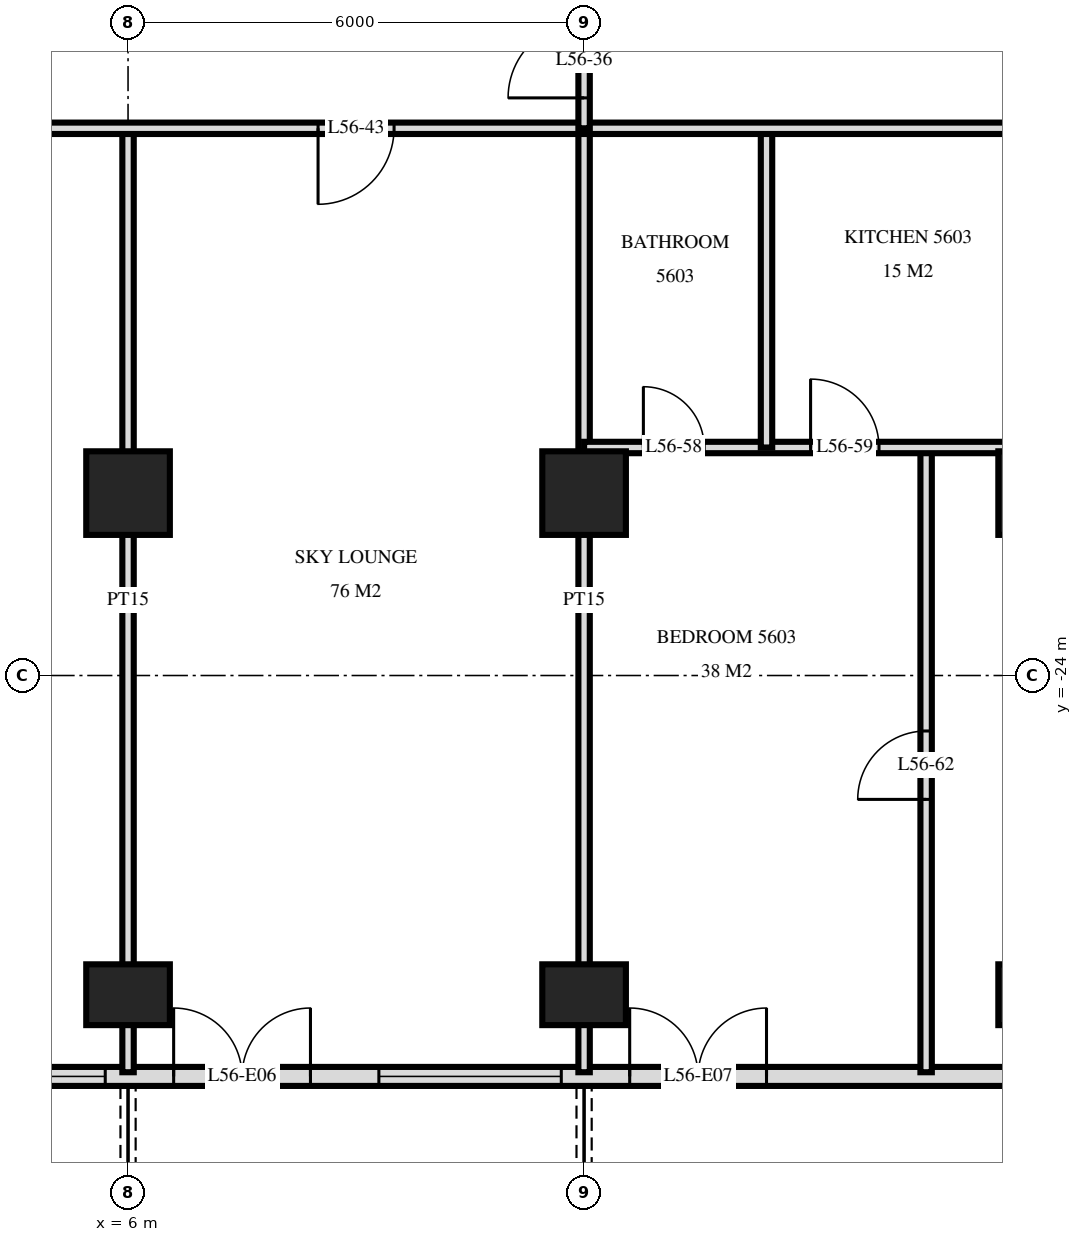
"""IFC4 building model, lengths in metres.
Left out: names, types, materials, properties, quantities, classifications, styles, units other than length and angle.
Written with IfcOpenShell. Run it as: python <this file> out.ifc"""

import sys

from ifc_helpers import new_model, si_unit, direction, frame, frame_2d, origin, origin_2d, place, context, subcontext, project, spatial, rectangle, extrude, element, fill, save


model = new_model("IFC4")
c1 = context("Model", 3, precision=1e-05, world=origin(), true_north=direction((0.0, 1.0)))
c2 = subcontext(c1, "Body", "Model", "MODEL_VIEW")
j1 = project(units=[si_unit("LENGTHUNIT", "METRE"), si_unit("PLANEANGLEUNIT", "RADIAN")], contexts=[c1])
p1 = place(None, origin())
s1 = spatial("IfcSite", under=j1, at=p1, CompositionType="ELEMENT")
p2 = place(p1, origin())
s2 = spatial("IfcBuilding", under=s1, at=p2, CompositionType="ELEMENT")
p3 = place(p2, frame((0.0, 0.0, 215.1)))
s3 = spatial("IfcBuildingStorey", under=s2, at=p3, CompositionType="ELEMENT", Elevation=215.1)
p4 = place(p3, frame((6.0, -28.2, 0.0), z_axis=(0.0, 0.0, 1.0), x_axis=(1.0, 0.0, 0.0)))
e1 = element("IfcColumn", 1, at=p4, inside=s3, PredefinedType="COLUMN", context=c2, shape_type="SweptSolid", body=[
    extrude(rectangle(XDim=1.1, YDim=0.8, at=origin_2d()), origin(), (0.0, 0.0, 1.0), 3.5),
])
p5 = place(p3, frame((6.0, -21.6, 0.0), z_axis=(0.0, 0.0, 1.0), x_axis=(1.0, 0.0, 0.0)))
e2 = element("IfcColumn", 2, at=p5, inside=s3, PredefinedType="COLUMN", context=c2, shape_type="SweptSolid", body=[
    extrude(rectangle(XDim=1.1, YDim=1.1, at=origin_2d()), origin(), (0.0, 0.0, 1.0), 3.5),
])
p6 = place(p3, frame((12.0, -28.2, 0.0), z_axis=(0.0, 0.0, 1.0), x_axis=(1.0, 0.0, 0.0)))
e3 = element("IfcColumn", 3, at=p6, inside=s3, PredefinedType="COLUMN", context=c2, shape_type="SweptSolid", body=[
    extrude(rectangle(XDim=1.1, YDim=0.8, at=origin_2d()), origin(), (0.0, 0.0, 1.0), 3.5),
])
p7 = place(p3, frame((12.0, -21.6, 0.0), z_axis=(0.0, 0.0, 1.0), x_axis=(1.0, 0.0, 0.0)))
e4 = element("IfcColumn", 4, at=p7, inside=s3, PredefinedType="COLUMN", context=c2, shape_type="SweptSolid", body=[
    extrude(rectangle(XDim=1.1, YDim=1.1, at=origin_2d()), origin(), (0.0, 0.0, 1.0), 3.5),
])
p8 = place(p3, frame((18.0, -28.2, 0.0), z_axis=(0.0, 0.0, 1.0), x_axis=(1.0, 0.0, 0.0)))
e5 = element("IfcColumn", 5, at=p8, inside=s3, PredefinedType="COLUMN", context=c2, shape_type="SweptSolid", body=[
    extrude(rectangle(XDim=1.1, YDim=0.8, at=origin_2d()), origin(), (0.0, 0.0, 1.0), 3.5),
])
p9 = place(p3, frame((18.0, -21.6, 0.0), z_axis=(0.0, 0.0, 1.0), x_axis=(1.0, 0.0, 0.0)))
e6 = element("IfcColumn", 6, at=p9, inside=s3, PredefinedType="COLUMN", context=c2, shape_type="SweptSolid", body=[
    extrude(rectangle(XDim=1.1, YDim=1.1, at=origin_2d()), origin(), (0.0, 0.0, 1.0), 3.5),
])
p10 = place(p3, frame((-22.475, -29.275, 0.0), z_axis=(0.0, 0.0, 1.0), x_axis=(1.0, 0.0, 0.0)))
e7 = element("IfcWall", 7, at=p10, inside=s3, PredefinedType="SOLIDWALL", context=c2, shape_type="SweptSolid", body=[
    extrude(rectangle(XDim=44.951, YDim=0.25, at=frame_2d((22.475, 0.0))), origin(), (0.0, 0.0, 1.0), 3.22),
])
p11 = place(p10, frame((0.575, 0.0, 0.0)))
e8 = element("IfcOpeningElement", 8, at=p11, cuts=e7, PredefinedType="OPENING", context=c2, shape_type="SweptSolid", body=[
    extrude(rectangle(XDim=1.8, YDim=2.4, at=frame_2d((0.9, 1.2))), frame((0.0, 0.135, 0.0), z_axis=(0.0, -1.0, 0.0), x_axis=(1.0, 0.0, 0.0)), (0.0, 0.0, 1.0), 0.27),
])
p12 = place(p10, frame((4.775, 0.0, 0.9)))
e9 = element("IfcOpeningElement", 9, at=p12, cuts=e7, PredefinedType="OPENING", context=c2, shape_type="SweptSolid", body=[
    extrude(rectangle(XDim=2.4, YDim=1.5, at=frame_2d((1.2, 0.75))), frame((0.0, 0.135, 0.0), z_axis=(0.0, -1.0, 0.0), x_axis=(1.0, 0.0, 0.0)), (0.0, 0.0, 1.0), 0.27),
])
p13 = place(p10, frame((8.075, 0.0, 0.0)))
e10 = element("IfcOpeningElement", 10, at=p13, cuts=e7, PredefinedType="OPENING", context=c2, shape_type="SweptSolid", body=[
    extrude(rectangle(XDim=1.8, YDim=2.4, at=frame_2d((0.9, 1.2))), frame((0.0, 0.135, 0.0), z_axis=(0.0, -1.0, 0.0), x_axis=(1.0, 0.0, 0.0)), (0.0, 0.0, 1.0), 0.27),
])
p14 = place(p10, frame((11.075, 0.0, 0.0)))
e11 = element("IfcOpeningElement", 11, at=p14, cuts=e7, PredefinedType="OPENING", context=c2, shape_type="SweptSolid", body=[
    extrude(rectangle(XDim=1.8, YDim=2.4, at=frame_2d((0.9, 1.2))), frame((0.0, 0.135, 0.0), z_axis=(0.0, -1.0, 0.0), x_axis=(1.0, 0.0, 0.0)), (0.0, 0.0, 1.0), 0.27),
])
p15 = place(p10, frame((13.775, 0.0, 0.9)))
e12 = element("IfcOpeningElement", 12, at=p15, cuts=e7, PredefinedType="OPENING", context=c2, shape_type="SweptSolid", body=[
    extrude(rectangle(XDim=2.4, YDim=1.5, at=frame_2d((1.2, 0.75))), frame((0.0, 0.135, 0.0), z_axis=(0.0, -1.0, 0.0), x_axis=(1.0, 0.0, 0.0)), (0.0, 0.0, 1.0), 0.27),
])
p16 = place(p10, frame((16.775, 0.0, 0.9)))
e13 = element("IfcOpeningElement", 13, at=p16, cuts=e7, PredefinedType="OPENING", context=c2, shape_type="SweptSolid", body=[
    extrude(rectangle(XDim=2.4, YDim=1.5, at=frame_2d((1.2, 0.75))), frame((0.0, 0.135, 0.0), z_axis=(0.0, -1.0, 0.0), x_axis=(1.0, 0.0, 0.0)), (0.0, 0.0, 1.0), 0.27),
])
p17 = place(p10, frame((20.075, 0.0, 0.0)))
e14 = element("IfcOpeningElement", 14, at=p17, cuts=e7, PredefinedType="OPENING", context=c2, shape_type="SweptSolid", body=[
    extrude(rectangle(XDim=1.8, YDim=2.4, at=frame_2d((0.9, 1.2))), frame((0.0, 0.135, 0.0), z_axis=(0.0, -1.0, 0.0), x_axis=(1.0, 0.0, 0.0)), (0.0, 0.0, 1.0), 0.27),
])
p18 = place(p10, frame((23.075, 0.0, 0.0)))
e15 = element("IfcOpeningElement", 15, at=p18, cuts=e7, PredefinedType="OPENING", context=c2, shape_type="SweptSolid", body=[
    extrude(rectangle(XDim=1.8, YDim=2.4, at=frame_2d((0.9, 1.2))), frame((0.0, 0.135, 0.0), z_axis=(0.0, -1.0, 0.0), x_axis=(1.0, 0.0, 0.0)), (0.0, 0.0, 1.0), 0.27),
])
p19 = place(p10, frame((25.775, 0.0, 0.9)))
e16 = element("IfcOpeningElement", 16, at=p19, cuts=e7, PredefinedType="OPENING", context=c2, shape_type="SweptSolid", body=[
    extrude(rectangle(XDim=2.4, YDim=1.5, at=frame_2d((1.2, 0.75))), frame((0.0, 0.135, 0.0), z_axis=(0.0, -1.0, 0.0), x_axis=(1.0, 0.0, 0.0)), (0.0, 0.0, 1.0), 0.27),
])
p20 = place(p10, frame((29.075, 0.0, 0.0)))
e17 = element("IfcOpeningElement", 17, at=p20, cuts=e7, PredefinedType="OPENING", context=c2, shape_type="SweptSolid", body=[
    extrude(rectangle(XDim=1.8, YDim=2.4, at=frame_2d((0.9, 1.2))), frame((0.0, 0.135, 0.0), z_axis=(0.0, -1.0, 0.0), x_axis=(1.0, 0.0, 0.0)), (0.0, 0.0, 1.0), 0.27),
])
p21 = place(p10, frame((31.775, 0.0, 0.9)))
e18 = element("IfcOpeningElement", 18, at=p21, cuts=e7, PredefinedType="OPENING", context=c2, shape_type="SweptSolid", body=[
    extrude(rectangle(XDim=2.4, YDim=1.5, at=frame_2d((1.2, 0.75))), frame((0.0, 0.135, 0.0), z_axis=(0.0, -1.0, 0.0), x_axis=(1.0, 0.0, 0.0)), (0.0, 0.0, 1.0), 0.27),
])
p22 = place(p10, frame((35.075, 0.0, 0.0)))
e19 = element("IfcOpeningElement", 19, at=p22, cuts=e7, PredefinedType="OPENING", context=c2, shape_type="SweptSolid", body=[
    extrude(rectangle(XDim=1.8, YDim=2.4, at=frame_2d((0.9, 1.2))), frame((0.0, 0.135, 0.0), z_axis=(0.0, -1.0, 0.0), x_axis=(1.0, 0.0, 0.0)), (0.0, 0.0, 1.0), 0.27),
])
p23 = place(p10, frame((41.075, 0.0, 0.0)))
e20 = element("IfcOpeningElement", 20, at=p23, cuts=e7, PredefinedType="OPENING", context=c2, shape_type="SweptSolid", body=[
    extrude(rectangle(XDim=1.8, YDim=2.4, at=frame_2d((0.9, 1.2))), frame((0.0, 0.135, 0.0), z_axis=(0.0, -1.0, 0.0), x_axis=(1.0, 0.0, 0.0)), (0.0, 0.0, 1.0), 0.27),
])
p24 = place(p3, frame((16.5, -29.22, 0.0), z_axis=(0.0, 0.0, 1.0), x_axis=(0.0, 1.0, 0.0)))
e21 = element("IfcWall", 21, at=p24, inside=s3, PredefinedType="PARTITIONING", context=c2, shape_type="SweptSolid", body=[
    extrude(rectangle(XDim=8.22, YDim=0.15, at=frame_2d((4.11, 0.0))), origin(), (0.0, 0.0, 1.0), 3.22),
])
p25 = place(p24, frame((3.59, 0.0, 0.0)))
e22 = element("IfcOpeningElement", 22, at=p25, cuts=e21, PredefinedType="OPENING", context=c2, shape_type="SweptSolid", body=[
    extrude(rectangle(XDim=0.9, YDim=2.1, at=frame_2d((0.45, 1.05))), frame((0.0, 0.085, 0.0), z_axis=(0.0, -1.0, 0.0), x_axis=(1.0, 0.0, 0.0)), (0.0, 0.0, 1.0), 0.17),
])
p26 = place(p3, frame((14.4, -21.0, 0.0), z_axis=(0.0, 0.0, 1.0), x_axis=(0.0, 1.0, 0.0)))
e23 = element("IfcWall", 23, at=p26, inside=s3, PredefinedType="PARTITIONING", context=c2, shape_type="SweptSolid", body=[
    extrude(rectangle(XDim=4.2, YDim=0.15, at=frame_2d((2.1, 0.0))), origin(), (0.0, 0.0, 1.0), 3.22),
])
p27 = place(p3, frame((12.0, -16.8, 0.0), z_axis=(0.0, 0.0, 1.0), x_axis=(0.0, 1.0, 0.0)))
e24 = element("IfcWall", 24, at=p27, inside=s3, PredefinedType="PARTITIONING", context=c2, shape_type="SweptSolid", body=[
    extrude(rectangle(XDim=1.75, YDim=0.15, at=frame_2d((0.875, 0.0))), origin(), (0.0, 0.0, 1.0), 3.22),
])
p28 = place(p27, frame((0.4, 0.0, 0.0)))
e25 = element("IfcOpeningElement", 25, at=p28, cuts=e24, PredefinedType="OPENING", context=c2, shape_type="SweptSolid", body=[
    extrude(rectangle(XDim=1.0, YDim=2.1, at=frame_2d((0.5, 1.05))), frame((0.0, 0.085, 0.0), z_axis=(0.0, -1.0, 0.0), x_axis=(1.0, 0.0, 0.0)), (0.0, 0.0, 1.0), 0.17),
])
for number, where, z_axis, x_axis in (
    (26, (12.0, -29.22, 0.0), (0.0, 0.0, 1.0), (0.0, 1.0, 0.0)),
    (27, (6.0, -29.22, 0.0), (0.0, 0.0, 1.0), (0.0, 1.0, 0.0)),
):
    element("IfcWall", number, at=place(p3, frame(where, z_axis=z_axis, x_axis=x_axis)), inside=s3, PredefinedType="PARTITIONING", context=c2, shape_type="SweptSolid", body=[
        extrude(rectangle(XDim=12.42, YDim=0.15, at=frame_2d((6.21, 0.0))), origin(), (0.0, 0.0, 1.0), 3.22),
    ])
p29 = place(p3, frame((12.0, -21.0, 0.0), z_axis=(0.0, 0.0, 1.0), x_axis=(1.0, 0.0, 0.0)))
e28 = element("IfcWall", 28, at=p29, inside=s3, PredefinedType="PARTITIONING", context=c2, shape_type="SweptSolid", body=[
    extrude(rectangle(XDim=8.4, YDim=0.15, at=frame_2d((4.2, 0.0))), origin(), (0.0, 0.0, 1.0), 3.22),
])
p30 = place(p29, frame((0.78, 0.0, 0.0)))
e29 = element("IfcOpeningElement", 29, at=p30, cuts=e28, PredefinedType="OPENING", context=c2, shape_type="SweptSolid", body=[
    extrude(rectangle(XDim=0.8, YDim=2.1, at=frame_2d((0.4, 1.05))), frame((0.0, 0.085, 0.0), z_axis=(0.0, -1.0, 0.0), x_axis=(1.0, 0.0, 0.0)), (0.0, 0.0, 1.0), 0.17),
])
p31 = place(p29, frame((2.98, 0.0, 0.0)))
e30 = element("IfcOpeningElement", 30, at=p31, cuts=e28, PredefinedType="OPENING", context=c2, shape_type="SweptSolid", body=[
    extrude(rectangle(XDim=0.9, YDim=2.1, at=frame_2d((0.45, 1.05))), frame((0.0, 0.085, 0.0), z_axis=(0.0, -1.0, 0.0), x_axis=(1.0, 0.0, 0.0)), (0.0, 0.0, 1.0), 0.17),
])
p32 = place(p3, frame((-26.82, -16.8, 0.0), z_axis=(0.0, 0.0, 1.0), x_axis=(1.0, 0.0, 0.0)))
e31 = element("IfcWall", 31, at=p32, inside=s3, PredefinedType="PARTITIONING", context=c2, shape_type="SweptSolid", body=[
    extrude(rectangle(XDim=53.64, YDim=0.15, at=frame_2d((26.82, 0.0))), origin(), (0.0, 0.0, 1.0), 3.22),
])
p33 = place(p32, frame((11.17, 0.0, 0.0)))
e32 = element("IfcOpeningElement", 32, at=p33, cuts=e31, PredefinedType="OPENING", context=c2, shape_type="SweptSolid", body=[
    extrude(rectangle(XDim=1.0, YDim=2.1, at=frame_2d((0.5, 1.05))), frame((0.0, 0.085, 0.0), z_axis=(0.0, -1.0, 0.0), x_axis=(1.0, 0.0, 0.0)), (0.0, 0.0, 1.0), 0.17),
])
p34 = place(p32, frame((3.22, 0.0, 0.0)))
e33 = element("IfcOpeningElement", 33, at=p34, cuts=e31, PredefinedType="OPENING", context=c2, shape_type="SweptSolid", body=[
    extrude(rectangle(XDim=1.0, YDim=2.1, at=frame_2d((0.5, 1.05))), frame((0.0, 0.085, 0.0), z_axis=(0.0, -1.0, 0.0), x_axis=(1.0, 0.0, 0.0)), (0.0, 0.0, 1.0), 0.17),
])
p35 = place(p32, frame((5.02, 0.0, 0.0)))
e34 = element("IfcOpeningElement", 34, at=p35, cuts=e31, PredefinedType="OPENING", context=c2, shape_type="SweptSolid", body=[
    extrude(rectangle(XDim=1.0, YDim=2.1, at=frame_2d((0.5, 1.05))), frame((0.0, 0.085, 0.0), z_axis=(0.0, -1.0, 0.0), x_axis=(1.0, 0.0, 0.0)), (0.0, 0.0, 1.0), 0.17),
])
p36 = place(p32, frame((47.72, 0.0, 0.0)))
e35 = element("IfcOpeningElement", 35, at=p36, cuts=e31, PredefinedType="OPENING", context=c2, shape_type="SweptSolid", body=[
    extrude(rectangle(XDim=1.0, YDim=2.1, at=frame_2d((0.5, 1.05))), frame((0.0, 0.085, 0.0), z_axis=(0.0, -1.0, 0.0), x_axis=(1.0, 0.0, 0.0)), (0.0, 0.0, 1.0), 0.17),
])
p37 = place(p32, frame((51.04, 0.0, 0.0)))
e36 = element("IfcOpeningElement", 36, at=p37, cuts=e31, PredefinedType="OPENING", context=c2, shape_type="SweptSolid", body=[
    extrude(rectangle(XDim=1.0, YDim=2.1, at=frame_2d((0.5, 1.05))), frame((0.0, 0.085, 0.0), z_axis=(0.0, -1.0, 0.0), x_axis=(1.0, 0.0, 0.0)), (0.0, 0.0, 1.0), 0.17),
])
p38 = place(p32, frame((17.32, 0.0, 0.0)))
e37 = element("IfcOpeningElement", 37, at=p38, cuts=e31, PredefinedType="OPENING", context=c2, shape_type="SweptSolid", body=[
    extrude(rectangle(XDim=1.0, YDim=2.1, at=frame_2d((0.5, 1.05))), frame((0.0, 0.085, 0.0), z_axis=(0.0, -1.0, 0.0), x_axis=(1.0, 0.0, 0.0)), (0.0, 0.0, 1.0), 0.17),
])
p39 = place(p32, frame((26.32, 0.0, 0.0)))
e38 = element("IfcOpeningElement", 38, at=p39, cuts=e31, PredefinedType="OPENING", context=c2, shape_type="SweptSolid", body=[
    extrude(rectangle(XDim=1.0, YDim=2.1, at=frame_2d((0.5, 1.05))), frame((0.0, 0.085, 0.0), z_axis=(0.0, -1.0, 0.0), x_axis=(1.0, 0.0, 0.0)), (0.0, 0.0, 1.0), 0.17),
])
p40 = place(p32, frame((35.32, 0.0, 0.0)))
e39 = element("IfcOpeningElement", 39, at=p40, cuts=e31, PredefinedType="OPENING", context=c2, shape_type="SweptSolid", body=[
    extrude(rectangle(XDim=1.0, YDim=2.1, at=frame_2d((0.5, 1.05))), frame((0.0, 0.085, 0.0), z_axis=(0.0, -1.0, 0.0), x_axis=(1.0, 0.0, 0.0)), (0.0, 0.0, 1.0), 0.17),
])
p41 = place(p19, origin())
e40 = element("IfcWindow", 40, at=p41, inside=s3, PartitioningType="SINGLE_PANEL", PredefinedType="WINDOW", context=c2, shape_type="SweptSolid", body=[
    extrude(rectangle(XDim=2.4, YDim=1.5, at=frame_2d((1.2, 0.75))), frame((0.0, 0.03, 0.0), z_axis=(0.0, -1.0, 0.0), x_axis=(1.0, 0.0, 0.0)), (0.0, 0.0, 1.0), 0.06),
])
fill(e16, e40)
p42 = place(p20, origin())
e41 = element("IfcDoor", 41, at=p42, inside=s3, OperationType="DOUBLE_DOOR_SINGLE_SWING", PredefinedType="DOOR", context=c2, shape_type="SweptSolid", body=[
    extrude(rectangle(XDim=1.8, YDim=2.4, at=frame_2d((0.9, 1.2))), frame((0.0, 0.025, 0.0), z_axis=(0.0, -1.0, 0.0), x_axis=(1.0, 0.0, 0.0)), (0.0, 0.0, 1.0), 0.05),
])
fill(e17, e41)
p43 = place(p21, origin())
e42 = element("IfcWindow", 42, at=p43, inside=s3, PartitioningType="SINGLE_PANEL", PredefinedType="WINDOW", context=c2, shape_type="SweptSolid", body=[
    extrude(rectangle(XDim=2.4, YDim=1.5, at=frame_2d((1.2, 0.75))), frame((0.0, 0.03, 0.0), z_axis=(0.0, -1.0, 0.0), x_axis=(1.0, 0.0, 0.0)), (0.0, 0.0, 1.0), 0.06),
])
fill(e18, e42)
p44 = place(p22, origin())
e43 = element("IfcDoor", 43, at=p44, inside=s3, OperationType="DOUBLE_DOOR_SINGLE_SWING", PredefinedType="DOOR", context=c2, shape_type="SweptSolid", body=[
    extrude(rectangle(XDim=1.8, YDim=2.4, at=frame_2d((0.9, 1.2))), frame((0.0, 0.025, 0.0), z_axis=(0.0, -1.0, 0.0), x_axis=(1.0, 0.0, 0.0)), (0.0, 0.0, 1.0), 0.05),
])
fill(e19, e43)
p45 = place(p28, origin())
e44 = element("IfcDoor", 44, at=p45, inside=s3, OperationType="SINGLE_SWING_RIGHT", PredefinedType="DOOR", context=c2, shape_type="SweptSolid", body=[
    extrude(rectangle(XDim=1.0, YDim=2.1, at=frame_2d((0.5, 1.05))), frame((0.0, 0.025, 0.0), z_axis=(0.0, -1.0, 0.0), x_axis=(1.0, 0.0, 0.0)), (0.0, 0.0, 1.0), 0.05),
])
fill(e25, e44)
p46 = place(p40, frame((0.5, 0.0, 0.0), z_axis=(0.0, 0.0, 1.0), x_axis=(-1.0, 0.0, 0.0)))
e45 = element("IfcDoor", 45, at=p46, inside=s3, OperationType="SINGLE_SWING_LEFT", PredefinedType="DOOR", context=c2, shape_type="SweptSolid", body=[
    extrude(rectangle(XDim=1.0, YDim=2.1, at=frame_2d((0.0, 1.05))), frame((0.0, -0.025, 0.0), z_axis=(0.0, 1.0, 0.0), x_axis=(-1.0, 0.0, 0.0)), (0.0, 0.0, 1.0), 0.05),
])
fill(e39, e45)
p47 = place(p30, origin())
e46 = element("IfcDoor", 46, at=p47, inside=s3, OperationType="SINGLE_SWING_RIGHT", PredefinedType="DOOR", context=c2, shape_type="SweptSolid", body=[
    extrude(rectangle(XDim=0.8, YDim=2.1, at=frame_2d((0.4, 1.05))), frame((0.0, 0.025, 0.0), z_axis=(0.0, -1.0, 0.0), x_axis=(1.0, 0.0, 0.0)), (0.0, 0.0, 1.0), 0.05),
])
fill(e29, e46)
p48 = place(p31, origin())
e47 = element("IfcDoor", 47, at=p48, inside=s3, OperationType="SINGLE_SWING_RIGHT", PredefinedType="DOOR", context=c2, shape_type="SweptSolid", body=[
    extrude(rectangle(XDim=0.9, YDim=2.1, at=frame_2d((0.45, 1.05))), frame((0.0, 0.025, 0.0), z_axis=(0.0, -1.0, 0.0), x_axis=(1.0, 0.0, 0.0)), (0.0, 0.0, 1.0), 0.05),
])
fill(e30, e47)
p49 = place(p25, origin())
e48 = element("IfcDoor", 48, at=p49, inside=s3, OperationType="SINGLE_SWING_RIGHT", PredefinedType="DOOR", context=c2, shape_type="SweptSolid", body=[
    extrude(rectangle(XDim=0.9, YDim=2.1, at=frame_2d((0.45, 1.05))), frame((0.0, 0.025, 0.0), z_axis=(0.0, -1.0, 0.0), x_axis=(1.0, 0.0, 0.0)), (0.0, 0.0, 1.0), 0.05),
])
fill(e22, e48)
save(model, sys.argv[1])
